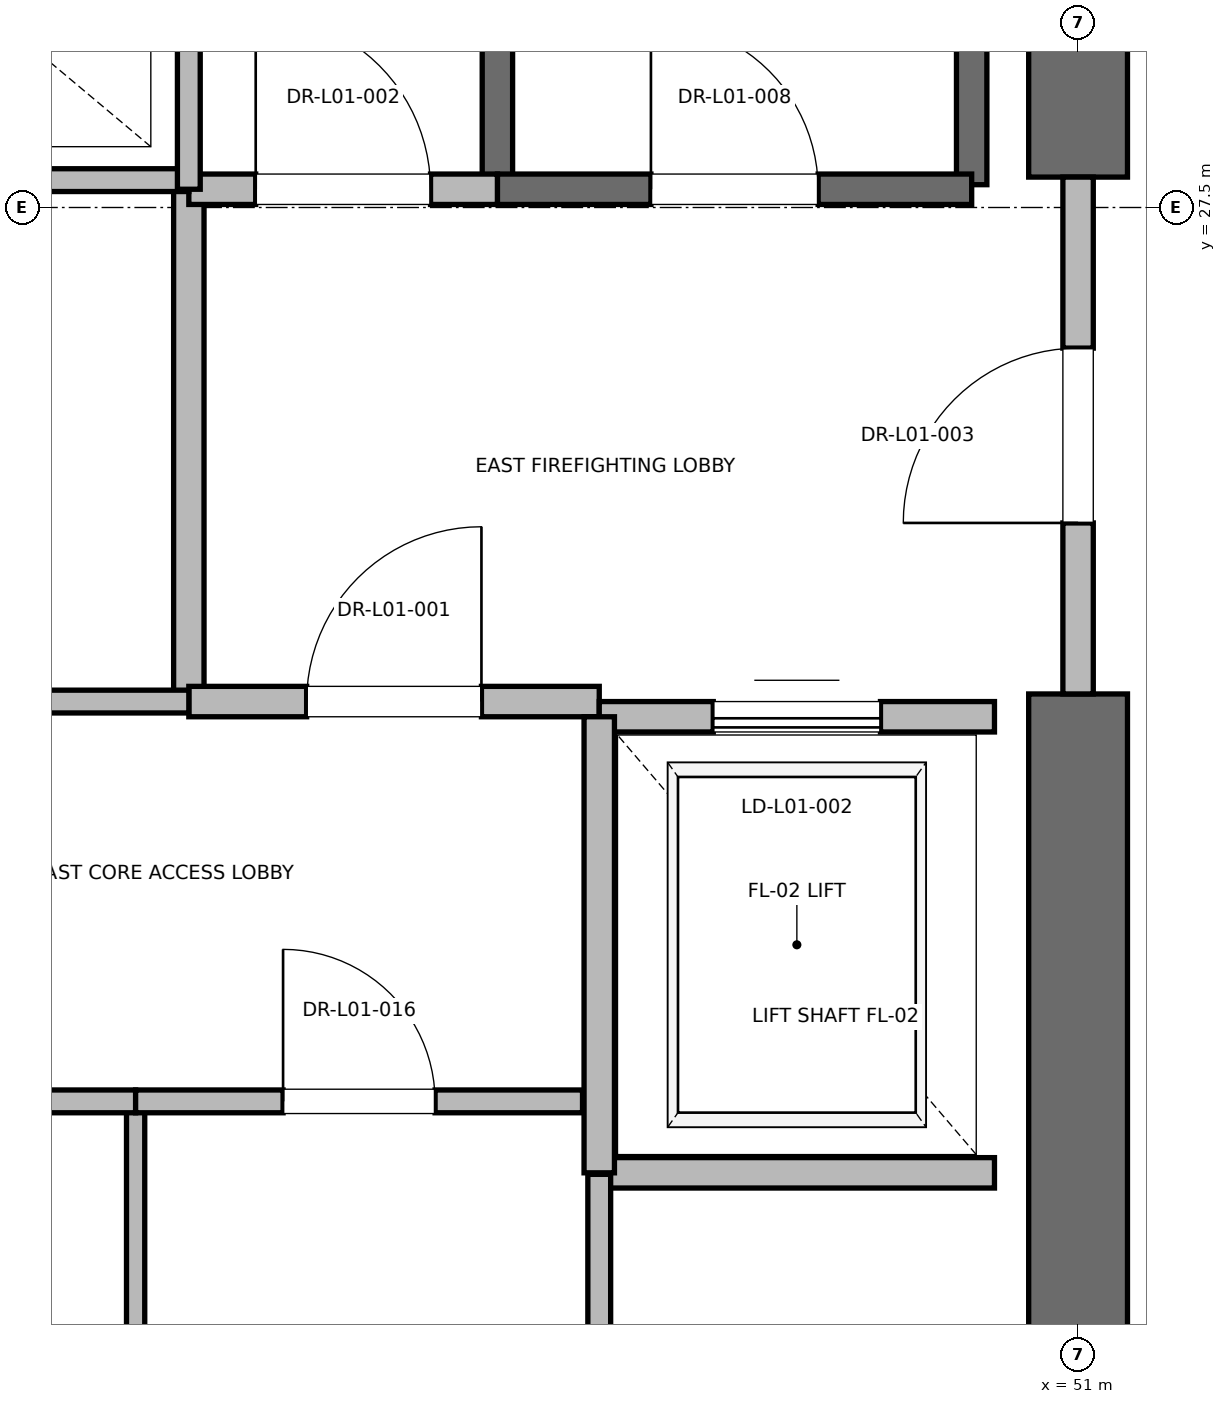
"""IFC4 building model, lengths in metres.
Left out: names, types, materials, properties, quantities, classifications, styles, units other than length and angle.
Written with IfcOpenShell. Run it as: python <this file> out.ifc"""

import sys

from ifc_helpers import new_model, si_unit, direction, frame, frame_2d, origin, place, context, subcontext, project, spatial, rectangle, extrude, element, fill, save


model = new_model("IFC4")
c1 = context("Model", 3, precision=1e-05, world=origin(), true_north=direction((0.0, 1.0)))
c2 = subcontext(c1, "Body", "Model", "MODEL_VIEW")
j1 = project(units=[si_unit("LENGTHUNIT", "METRE"), si_unit("PLANEANGLEUNIT", "RADIAN")], contexts=[c1])
p1 = place(None, origin())
s1 = spatial("IfcSite", under=j1, at=p1, CompositionType="ELEMENT")
p2 = place(p1, origin())
s2 = spatial("IfcBuilding", under=s1, at=p2, CompositionType="ELEMENT")
p3 = place(p2, frame((0.0, 0.0, 6.0)))
s3 = spatial("IfcBuildingStorey", under=s2, at=p3, CompositionType="ELEMENT", Elevation=6.0)
p4 = place(p3, frame((51.0, 18.5, 0.0), z_axis=(0.0, 0.0, 1.0), x_axis=(0.0, 1.0, 0.0)))
e1 = element("IfcWall", 1, at=p4, inside=s3, PredefinedType="SHEAR", context=c2, shape_type="SweptSolid", body=[
    extrude(rectangle(XDim=5.8, YDim=0.65, at=frame_2d((2.9, 0.0))), origin(), (0.0, 0.0, 1.0), 4.92),
])
p5 = place(p3, frame((51.0, 27.7, 0.0), z_axis=(0.0, 0.0, 1.0), x_axis=(0.0, 1.0, 0.0)))
e2 = element("IfcWall", 2, at=p5, inside=s3, PredefinedType="SHEAR", context=c2, shape_type="SweptSolid", body=[
    extrude(rectangle(XDim=8.8, YDim=0.65, at=frame_2d((4.4, 0.0))), origin(), (0.0, 0.0, 1.0), 4.92),
])
p6 = place(p3, frame((50.3, 27.65, 0.0), z_axis=(0.0, 0.0, 1.0), x_axis=(0.0, 1.0, 0.0)))
e3 = element("IfcWall", 3, at=p6, inside=s3, PredefinedType="SOLIDWALL", context=c2, shape_type="SweptSolid", body=[
    extrude(rectangle(XDim=8.15, YDim=0.2, at=frame_2d((4.075, 0.0))), origin(), (0.0, 0.0, 1.0), 4.92),
])
p7 = place(p3, frame((47.18, 27.62, 0.0), z_axis=(0.0, 0.0, 1.0), x_axis=(0.0, 1.0, 0.0)))
e4 = element("IfcWall", 4, at=p7, inside=s3, PredefinedType="SOLIDWALL", context=c2, shape_type="SweptSolid", body=[
    extrude(rectangle(XDim=8.18, YDim=0.2, at=frame_2d((4.09, 0.0))), origin(), (0.0, 0.0, 1.0), 4.92),
])
p8 = place(p3, frame((47.18, 27.62, 0.0), z_axis=(0.0, 0.0, 1.0), x_axis=(1.0, 0.0, 0.0)))
e5 = element("IfcWall", 5, at=p8, inside=s3, PredefinedType="SOLIDWALL", context=c2, shape_type="SweptSolid", body=[
    extrude(rectangle(XDim=3.12, YDim=0.2, at=frame_2d((1.56, 0.0))), origin(), (0.0, 0.0, 1.0), 4.92),
])
p9 = place(p8, frame((1.01, 0.0, 0.0)))
e6 = element("IfcOpeningElement", 6, at=p9, cuts=e5, PredefinedType="OPENING", context=c2, shape_type="SweptSolid", body=[
    extrude(rectangle(XDim=1.1, YDim=2.15, at=frame_2d((0.55, 1.075))), frame((0.0, 0.1, 0.0), z_axis=(0.0, -1.0, 0.0), x_axis=(1.0, 0.0, 0.0)), (0.0, 0.0, 1.0), 0.2),
])
p10 = place(p3, frame((45.15, 24.25, 0.0), z_axis=(0.0, 0.0, 1.0), x_axis=(0.0, 1.0, 0.0)))
e7 = element("IfcWall", 7, at=p10, inside=s3, PredefinedType="PARTITIONING", context=c2, shape_type="SweptSolid", body=[
    extrude(rectangle(XDim=3.37, YDim=0.2, at=frame_2d((1.685, 0.0))), origin(), (0.0, 0.0, 1.0), 4.92),
])
p11 = place(p3, frame((45.15, 24.25, 0.0), z_axis=(0.0, 0.0, 1.0), x_axis=(1.0, 0.0, 0.0)))
e8 = element("IfcWall", 8, at=p11, inside=s3, PredefinedType="PARTITIONING", context=c2, shape_type="SweptSolid", body=[
    extrude(rectangle(XDim=2.7, YDim=0.2, at=frame_2d((1.35, 0.0))), origin(), (0.0, 0.0, 1.0), 4.92),
])
p12 = place(p11, frame((0.775, 0.0, 0.0)))
e9 = element("IfcOpeningElement", 9, at=p12, cuts=e8, PredefinedType="OPENING", context=c2, shape_type="SweptSolid", body=[
    extrude(rectangle(XDim=1.15, YDim=2.2, at=frame_2d((0.575, 1.1))), frame((0.0, 0.1, 0.0), z_axis=(0.0, -1.0, 0.0), x_axis=(1.0, 0.0, 0.0)), (0.0, 0.0, 1.0), 0.2),
])
p13 = place(p3, frame((45.15, 27.62, 0.0), z_axis=(0.0, 0.0, 1.0), x_axis=(1.0, 0.0, 0.0)))
e10 = element("IfcWall", 10, at=p13, inside=s3, PredefinedType="PARTITIONING", context=c2, shape_type="SweptSolid", body=[
    extrude(rectangle(XDim=2.03, YDim=0.2, at=frame_2d((1.015, 0.0))), origin(), (0.0, 0.0, 1.0), 4.92),
])
p14 = place(p13, frame((0.44, 0.0, 0.0)))
e11 = element("IfcOpeningElement", 11, at=p14, cuts=e10, PredefinedType="OPENING", context=c2, shape_type="SweptSolid", body=[
    extrude(rectangle(XDim=1.15, YDim=2.2, at=frame_2d((0.575, 1.1))), frame((0.0, 0.1, 0.0), z_axis=(0.0, -1.0, 0.0), x_axis=(1.0, 0.0, 0.0)), (0.0, 0.0, 1.0), 0.2),
])
p15 = place(p3, frame((51.0, 24.3, 0.0), z_axis=(0.0, 0.0, 1.0), x_axis=(0.0, 1.0, 0.0)))
e12 = element("IfcWall", 12, at=p15, inside=s3, PredefinedType="PARTITIONING", context=c2, shape_type="SweptSolid", body=[
    extrude(rectangle(XDim=3.4, YDim=0.2, at=frame_2d((1.7, 0.0))), origin(), (0.0, 0.0, 1.0), 3.7),
])
p16 = place(p15, frame((1.125, 0.0, 0.0)))
e13 = element("IfcOpeningElement", 13, at=p16, cuts=e12, PredefinedType="OPENING", context=c2, shape_type="SweptSolid", body=[
    extrude(rectangle(XDim=1.15, YDim=2.2, at=frame_2d((0.575, 1.1))), frame((0.0, 0.1, 0.0), z_axis=(0.0, -1.0, 0.0), x_axis=(1.0, 0.0, 0.0)), (0.0, 0.0, 1.0), 0.2),
])
p17 = place(p3, frame((47.85, 21.15, 0.0), z_axis=(0.0, 0.0, 1.0), x_axis=(1.0, 0.0, 0.0)))
e14 = element("IfcWall", 14, at=p17, inside=s3, PredefinedType="SOLIDWALL", context=c2, shape_type="SweptSolid", body=[
    extrude(rectangle(XDim=2.6, YDim=0.2, at=frame_2d((1.3, 0.0))), origin(), (0.0, 0.0, 1.0), 4.92),
])
p18 = place(p3, frame((50.45, 24.15, 0.0), z_axis=(0.0, 0.0, 1.0), x_axis=(-1.0, 0.0, 0.0)))
e15 = element("IfcWall", 15, at=p18, inside=s3, PredefinedType="SOLIDWALL", context=c2, shape_type="SweptSolid", body=[
    extrude(rectangle(XDim=2.6, YDim=0.2, at=frame_2d((1.3, 0.0))), origin(), (0.0, 0.0, 1.0), 3.7),
])
p19 = place(p18, frame((0.75, 0.0, 0.0)))
e16 = element("IfcOpeningElement", 16, at=p19, cuts=e15, PredefinedType="OPENING", context=c2, shape_type="SweptSolid", body=[
    extrude(rectangle(XDim=1.1, YDim=2.2, at=frame_2d((0.55, 1.1))), frame((0.0, 0.1, 0.0), z_axis=(0.0, -1.0, 0.0), x_axis=(1.0, 0.0, 0.0)), (0.0, 0.0, 1.0), 0.2),
])
p20 = place(p3, frame((47.85, 24.15, 0.0), z_axis=(0.0, 0.0, 1.0), x_axis=(0.0, -1.0, 0.0)))
e17 = element("IfcWall", 17, at=p20, inside=s3, PredefinedType="SOLIDWALL", context=c2, shape_type="SweptSolid", body=[
    extrude(rectangle(XDim=3.0, YDim=0.2, at=frame_2d((1.5, 0.0))), origin(), (0.0, 0.0, 1.0), 4.92),
])
p21 = place(p3, frame((41.56, 27.68, 0.0), z_axis=(0.0, 0.0, 1.0), x_axis=(1.0, 0.0, 0.0)))
e18 = element("IfcWall", 18, at=p21, inside=s3, PredefinedType="PARTITIONING", context=c2, shape_type="SweptSolid", body=[
    extrude(rectangle(XDim=3.59, YDim=0.15, at=frame_2d((1.795, 0.0))), origin(), (0.0, 0.0, 1.0), 2.85),
])
p22 = place(p3, frame((47.85, 18.6, 0.0), z_axis=(0.0, 0.0, 1.0), x_axis=(0.0, 1.0, 0.0)))
e19 = element("IfcWall", 19, at=p22, inside=s3, PredefinedType="PARTITIONING", context=c2, shape_type="SweptSolid", body=[
    extrude(rectangle(XDim=2.54, YDim=0.15, at=frame_2d((1.27, 0.0))), origin(), (0.0, 0.0, 1.0), 2.85),
])
p23 = place(p3, frame((44.8, 18.6, 0.0), z_axis=(0.0, 0.0, 1.0), x_axis=(0.0, 1.0, 0.0)))
e20 = element("IfcWall", 20, at=p23, inside=s3, PredefinedType="PARTITIONING", context=c2, shape_type="SweptSolid", body=[
    extrude(rectangle(XDim=3.02, YDim=0.12, at=frame_2d((1.51, 0.0))), origin(), (0.0, 0.0, 1.0), 2.85),
])
p24 = place(p3, frame((41.76, 21.62, 0.0), z_axis=(0.0, 0.0, 1.0), x_axis=(1.0, 0.0, 0.0)))
e21 = element("IfcWall", 21, at=p24, inside=s3, PredefinedType="PARTITIONING", context=c2, shape_type="SweptSolid", body=[
    extrude(rectangle(XDim=3.04, YDim=0.15, at=frame_2d((1.52, 0.0))), origin(), (0.0, 0.0, 1.0), 2.85),
])
p25 = place(p24, frame((1.02, 0.0, 0.0)))
e22 = element("IfcOpeningElement", 22, at=p25, cuts=e21, PredefinedType="OPENING", context=c2, shape_type="SweptSolid", body=[
    extrude(rectangle(XDim=1.0, YDim=2.15, at=frame_2d((0.5, 1.075))), frame((0.0, 0.075, 0.0), z_axis=(0.0, -1.0, 0.0), x_axis=(1.0, 0.0, 0.0)), (0.0, 0.0, 1.0), 0.15),
])
p26 = place(p3, frame((44.8, 21.62, 0.0), z_axis=(0.0, 0.0, 1.0), x_axis=(1.0, 0.0, 0.0)))
e23 = element("IfcWall", 23, at=p26, inside=s3, PredefinedType="PARTITIONING", context=c2, shape_type="SweptSolid", body=[
    extrude(rectangle(XDim=2.94, YDim=0.15, at=frame_2d((1.47, 0.0))), origin(), (0.0, 0.0, 1.0), 2.85),
])
p27 = place(p26, frame((0.97, 0.0, 0.0)))
e24 = element("IfcOpeningElement", 24, at=p27, cuts=e23, PredefinedType="OPENING", context=c2, shape_type="SweptSolid", body=[
    extrude(rectangle(XDim=1.0, YDim=2.15, at=frame_2d((0.5, 1.075))), frame((0.0, 0.075, 0.0), z_axis=(0.0, -1.0, 0.0), x_axis=(1.0, 0.0, 0.0)), (0.0, 0.0, 1.0), 0.15),
])
p28 = place(p3, frame((41.76, 24.25, 0.0), z_axis=(0.0, 0.0, 1.0), x_axis=(1.0, 0.0, 0.0)))
e25 = element("IfcWall", 25, at=p28, inside=s3, PredefinedType="PARTITIONING", context=c2, shape_type="SweptSolid", body=[
    extrude(rectangle(XDim=3.39, YDim=0.15, at=frame_2d((1.695, 0.0))), origin(), (0.0, 0.0, 1.0), 2.85),
])
p29 = place(p28, frame((1.255, 0.0, 0.0)))
e26 = element("IfcOpeningElement", 26, at=p29, cuts=e25, PredefinedType="OPENING", context=c2, shape_type="SweptSolid", body=[
    extrude(rectangle(XDim=0.88, YDim=2.1, at=frame_2d((0.44, 1.05))), frame((0.0, 0.075, 0.0), z_axis=(0.0, -1.0, 0.0), x_axis=(1.0, 0.0, 0.0)), (0.0, 0.0, 1.0), 0.15),
])
p30 = place(p3, frame((45.15, 27.62, 0.0), z_axis=(0.0, 0.0, 1.0), x_axis=(0.0, 1.0, 0.0)))
e27 = element("IfcWall", 27, at=p30, inside=s3, PredefinedType="PARTITIONING", context=c2, shape_type="SweptSolid", body=[
    extrude(rectangle(XDim=3.1, YDim=0.15, at=frame_2d((1.55, 0.0))), origin(), (0.0, 0.0, 1.0), 2.85),
])
p31 = place(p9, origin())
e28 = element("IfcDoor", 28, at=p31, inside=s3, OperationType="SINGLE_SWING_LEFT", PredefinedType="DOOR", context=c2, shape_type="SweptSolid", body=[
    extrude(rectangle(XDim=1.1, YDim=2.15, at=frame_2d((0.55, 1.075))), frame((0.0, 0.025, 0.0), z_axis=(0.0, -1.0, 0.0), x_axis=(1.0, 0.0, 0.0)), (0.0, 0.0, 1.0), 0.05),
])
fill(e6, e28)
p32 = place(p12, origin())
e29 = element("IfcDoor", 29, at=p32, inside=s3, OperationType="SINGLE_SWING_RIGHT", PredefinedType="DOOR", context=c2, shape_type="SweptSolid", body=[
    extrude(rectangle(XDim=1.15, YDim=2.2, at=frame_2d((0.575, 1.1))), frame((0.0, 0.025, 0.0), z_axis=(0.0, -1.0, 0.0), x_axis=(1.0, 0.0, 0.0)), (0.0, 0.0, 1.0), 0.05),
])
fill(e9, e29)
p33 = place(p14, origin())
e30 = element("IfcDoor", 30, at=p33, inside=s3, OperationType="SINGLE_SWING_LEFT", PredefinedType="DOOR", context=c2, shape_type="SweptSolid", body=[
    extrude(rectangle(XDim=1.15, YDim=2.2, at=frame_2d((0.575, 1.1))), frame((0.0, 0.025, 0.0), z_axis=(0.0, -1.0, 0.0), x_axis=(1.0, 0.0, 0.0)), (0.0, 0.0, 1.0), 0.05),
])
fill(e11, e30)
p34 = place(p16, origin())
e31 = element("IfcDoor", 31, at=p34, inside=s3, OperationType="SINGLE_SWING_LEFT", PredefinedType="DOOR", context=c2, shape_type="SweptSolid", body=[
    extrude(rectangle(XDim=1.15, YDim=2.2, at=frame_2d((0.575, 1.1))), frame((0.0, 0.025, 0.0), z_axis=(0.0, -1.0, 0.0), x_axis=(1.0, 0.0, 0.0)), (0.0, 0.0, 1.0), 0.05),
])
fill(e13, e31)
p35 = place(p19, origin())
e32 = element("IfcDoor", 32, at=p35, inside=s3, OperationType="SLIDING_TO_RIGHT", PredefinedType="DOOR", context=c2, shape_type="SweptSolid", body=[
    extrude(rectangle(XDim=1.1, YDim=2.2, at=frame_2d((0.55, 1.1))), frame((0.0, 0.025, 0.0), z_axis=(0.0, -1.0, 0.0), x_axis=(1.0, 0.0, 0.0)), (0.0, 0.0, 1.0), 0.05),
])
fill(e16, e32)
p36 = place(p27, origin())
e33 = element("IfcDoor", 33, at=p36, inside=s3, OperationType="SINGLE_SWING_LEFT", PredefinedType="DOOR", context=c2, shape_type="SweptSolid", body=[
    extrude(rectangle(XDim=1.0, YDim=2.15, at=frame_2d((0.5, 1.075))), frame((0.0, 0.025, 0.0), z_axis=(0.0, -1.0, 0.0), x_axis=(1.0, 0.0, 0.0)), (0.0, 0.0, 1.0), 0.05),
])
fill(e24, e33)
save(model, sys.argv[1])
